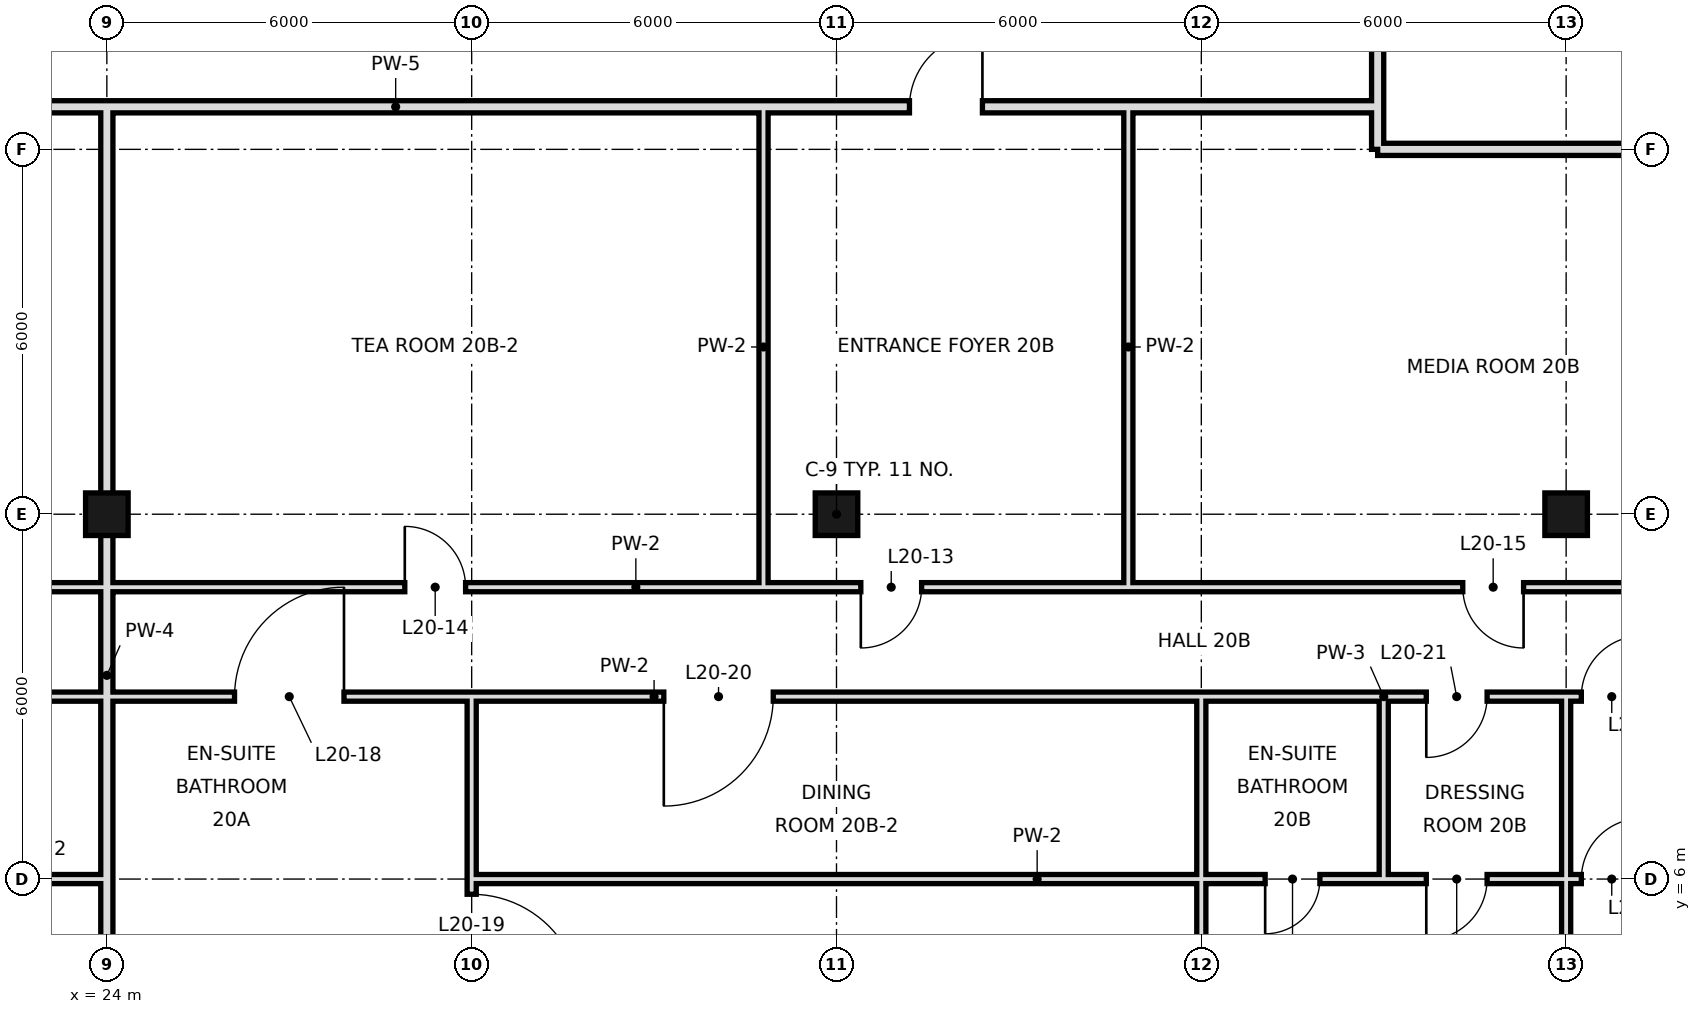
"""IFC4 building model, lengths in metres.
Left out: names, types, materials, properties, quantities, classifications, styles, units other than length and angle.
Written with IfcOpenShell. Run it as: python <this file> out.ifc"""

import sys

from ifc_helpers import new_model, si_unit, direction, frame, frame_2d, origin, origin_2d, place, context, subcontext, project, spatial, rectangle, hollow_rectangle, extrude, element, fill, save


model = new_model("IFC4")
c1 = context("Model", 3, precision=1e-05, world=origin(), true_north=direction((0.0, 1.0)))
c2 = subcontext(c1, "Body", "Model", "MODEL_VIEW")
j1 = project(units=[si_unit("LENGTHUNIT", "METRE"), si_unit("PLANEANGLEUNIT", "RADIAN")], contexts=[c1])
p1 = place(None, origin())
s1 = spatial("IfcSite", under=j1, at=p1, CompositionType="ELEMENT")
p2 = place(p1, origin())
s2 = spatial("IfcBuilding", under=s1, at=p2, CompositionType="ELEMENT")
p3 = place(p2, frame((0.0, 0.0, 96.2)))
s3 = spatial("IfcBuildingStorey", under=s2, at=p3, CompositionType="ELEMENT", Elevation=96.2)
for number, where, z_axis, x_axis in (
    (1, (24.0, 12.0, 0.0), (0.0, 0.0, 1.0), (1.0, 0.0, 0.0)),
    (2, (36.0, 12.0, 0.0), (0.0, 0.0, 1.0), (1.0, 0.0, 0.0)),
    (3, (48.0, 12.0, 0.0), (0.0, 0.0, 1.0), (1.0, 0.0, 0.0)),
):
    element("IfcColumn", number, at=place(p3, frame(where, z_axis=z_axis, x_axis=x_axis)), inside=s3, PredefinedType="COLUMN", context=c2, shape_type="SweptSolid", body=[
        extrude(hollow_rectangle(XDim=0.7, YDim=0.7, WallThickness=0.036, at=origin_2d()), origin(), (0.0, 0.0, 1.0), 3.6),
    ])
p4 = place(p3, frame((24.0, 0.0, 0.0), z_axis=(0.0, 0.0, 1.0), x_axis=(0.0, 1.0, 0.0)))
e4 = element("IfcWall", 4, at=p4, inside=s3, PredefinedType="SOLIDWALL", context=c2, shape_type="SweptSolid", body=[
    extrude(rectangle(XDim=18.7, YDim=0.2, at=frame_2d((9.35, 0.0))), origin(), (0.0, 0.0, 1.0), 2.72),
])
p5 = place(p3, frame((30.0, -0.6, 0.0), z_axis=(0.0, 0.0, 1.0), x_axis=(0.0, 1.0, 0.0)))
e5 = element("IfcWall", 5, at=p5, inside=s3, PredefinedType="PARTITIONING", context=c2, shape_type="SweptSolid", body=[
    extrude(rectangle(XDim=9.6, YDim=0.15, at=frame_2d((4.8, 0.0))), origin(), (0.0, 0.0, 1.0), 2.72),
])
p6 = place(p5, frame((4.55, 0.0, 0.0)))
e6 = element("IfcOpeningElement", 6, at=p6, cuts=e5, PredefinedType="OPENING", context=c2, shape_type="SweptSolid", body=[
    extrude(rectangle(XDim=1.8, YDim=2.4, at=frame_2d((0.9, 1.2))), frame((0.0, 0.085, 0.0), z_axis=(0.0, -1.0, 0.0), x_axis=(1.0, 0.0, 0.0)), (0.0, 0.0, 1.0), 0.17),
])
for number, where, z_axis, x_axis in (
    (7, (34.8, 10.8, 0.0), (0.0, 0.0, 1.0), (0.0, 1.0, 0.0)),
    (8, (40.8, 10.8, 0.0), (0.0, 0.0, 1.0), (0.0, 1.0, 0.0)),
):
    element("IfcWall", number, at=place(p3, frame(where, z_axis=z_axis, x_axis=x_axis)), inside=s3, PredefinedType="PARTITIONING", context=c2, shape_type="SweptSolid", body=[
        extrude(rectangle(XDim=7.9, YDim=0.15, at=frame_2d((3.95, 0.0))), origin(), (0.0, 0.0, 1.0), 3.42),
    ])
p7 = place(p3, frame((42.0, -0.6, 0.0), z_axis=(0.0, 0.0, 1.0), x_axis=(0.0, 1.0, 0.0)))
e9 = element("IfcWall", 9, at=p7, inside=s3, PredefinedType="PARTITIONING", context=c2, shape_type="SweptSolid", body=[
    extrude(rectangle(XDim=6.6, YDim=0.15, at=frame_2d((3.3, 0.0))), origin(), (0.0, 0.0, 1.0), 2.72),
])
p8 = place(p3, frame((42.0, 6.0, 0.0), z_axis=(0.0, 0.0, 1.0), x_axis=(0.0, 1.0, 0.0)))
e10 = element("IfcWall", 10, at=p8, inside=s3, PredefinedType="PARTITIONING", context=c2, shape_type="SweptSolid", body=[
    extrude(rectangle(XDim=3.0, YDim=0.15, at=frame_2d((1.5, 0.0))), origin(), (0.0, 0.0, 1.0), 2.72),
])
p9 = place(p3, frame((44.9, 18.0, 0.0), z_axis=(0.0, 0.0, 1.0), x_axis=(0.0, 1.0, 0.0)))
e11 = element("IfcWall", 11, at=p9, inside=s3, PredefinedType="SOLIDWALL", context=c2, shape_type="SweptSolid", body=[
    extrude(rectangle(XDim=4.2, YDim=0.2, at=frame_2d((2.1, 0.0))), origin(), (0.0, 0.0, 1.0), 2.97),
])
p10 = place(p3, frame((45.0, 6.0, 0.0), z_axis=(0.0, 0.0, 1.0), x_axis=(0.0, 1.0, 0.0)))
e12 = element("IfcWall", 12, at=p10, inside=s3, PredefinedType="PARTITIONING", context=c2, shape_type="SweptSolid", body=[
    extrude(rectangle(XDim=3.0, YDim=0.15, at=frame_2d((1.5, 0.0))), origin(), (0.0, 0.0, 1.0), 3.42),
])
p11 = place(p3, frame((48.0, 0.0, 0.0), z_axis=(0.0, 0.0, 1.0), x_axis=(0.0, 1.0, 0.0)))
e13 = element("IfcWall", 13, at=p11, inside=s3, PredefinedType="PARTITIONING", context=c2, shape_type="SweptSolid", body=[
    extrude(rectangle(XDim=9.0, YDim=0.15, at=frame_2d((4.5, 0.0))), origin(), (0.0, 0.0, 1.0), 2.72),
])
p12 = place(p3, frame((12.6, 10.8, 0.0), z_axis=(0.0, 0.0, 1.0), x_axis=(1.0, 0.0, 0.0)))
e14 = element("IfcWall", 14, at=p12, inside=s3, PredefinedType="PARTITIONING", context=c2, shape_type="SweptSolid", body=[
    extrude(rectangle(XDim=40.2, YDim=0.15, at=frame_2d((20.1, 0.0))), origin(), (0.0, 0.0, 1.0), 3.42),
])
p13 = place(p12, frame((8.5, 0.0, 0.0)))
e15 = element("IfcOpeningElement", 15, at=p13, cuts=e14, PredefinedType="OPENING", context=c2, shape_type="SweptSolid", body=[
    extrude(rectangle(XDim=1.0, YDim=2.4, at=frame_2d((0.5, 1.2))), frame((0.0, 0.085, 0.0), z_axis=(0.0, -1.0, 0.0), x_axis=(1.0, 0.0, 0.0)), (0.0, 0.0, 1.0), 0.17),
])
p14 = place(p12, frame((1.78, 0.0, 0.0)))
e16 = element("IfcOpeningElement", 16, at=p14, cuts=e14, PredefinedType="OPENING", context=c2, shape_type="SweptSolid", body=[
    extrude(rectangle(XDim=1.0, YDim=2.4, at=frame_2d((0.5, 1.2))), frame((0.0, 0.085, 0.0), z_axis=(0.0, -1.0, 0.0), x_axis=(1.0, 0.0, 0.0)), (0.0, 0.0, 1.0), 0.17),
])
p15 = place(p12, frame((23.8, 0.0, 0.0)))
e17 = element("IfcOpeningElement", 17, at=p15, cuts=e14, PredefinedType="OPENING", context=c2, shape_type="SweptSolid", body=[
    extrude(rectangle(XDim=1.0, YDim=2.4, at=frame_2d((0.5, 1.2))), frame((0.0, 0.085, 0.0), z_axis=(0.0, -1.0, 0.0), x_axis=(1.0, 0.0, 0.0)), (0.0, 0.0, 1.0), 0.17),
])
p16 = place(p12, frame((16.3, 0.0, 0.0)))
e18 = element("IfcOpeningElement", 18, at=p16, cuts=e14, PredefinedType="OPENING", context=c2, shape_type="SweptSolid", body=[
    extrude(rectangle(XDim=1.0, YDim=2.4, at=frame_2d((0.5, 1.2))), frame((0.0, 0.085, 0.0), z_axis=(0.0, -1.0, 0.0), x_axis=(1.0, 0.0, 0.0)), (0.0, 0.0, 1.0), 0.17),
])
p17 = place(p12, frame((33.7, 0.0, 0.0)))
e19 = element("IfcOpeningElement", 19, at=p17, cuts=e14, PredefinedType="OPENING", context=c2, shape_type="SweptSolid", body=[
    extrude(rectangle(XDim=1.0, YDim=2.4, at=frame_2d((0.5, 1.2))), frame((0.0, 0.085, 0.0), z_axis=(0.0, -1.0, 0.0), x_axis=(1.0, 0.0, 0.0)), (0.0, 0.0, 1.0), 0.17),
])
p18 = place(p3, frame((44.9, 18.0, 0.0), z_axis=(0.0, 0.0, 1.0), x_axis=(1.0, 0.0, 0.0)))
e20 = element("IfcWall", 20, at=p18, inside=s3, PredefinedType="SOLIDWALL", context=c2, shape_type="SweptSolid", body=[
    extrude(rectangle(XDim=4.3, YDim=0.2, at=frame_2d((2.15, 0.0))), origin(), (0.0, 0.0, 1.0), 2.72),
])
p19 = place(p3, frame((12.6, 18.7, 0.0), z_axis=(0.0, 0.0, 1.0), x_axis=(1.0, 0.0, 0.0)))
e21 = element("IfcWall", 21, at=p19, inside=s3, PredefinedType="SOLIDWALL", context=c2, shape_type="SweptSolid", body=[
    extrude(rectangle(XDim=32.3, YDim=0.2, at=frame_2d((16.15, 0.0))), origin(), (0.0, 0.0, 1.0), 2.72),
])
p20 = place(p19, frame((7.78, 0.0, 0.0)))
e22 = element("IfcOpeningElement", 22, at=p20, cuts=e21, PredefinedType="OPENING", context=c2, shape_type="SweptSolid", body=[
    extrude(rectangle(XDim=1.2, YDim=2.4, at=frame_2d((0.6, 1.2))), frame((0.0, 0.11, 0.0), z_axis=(0.0, -1.0, 0.0), x_axis=(1.0, 0.0, 0.0)), (0.0, 0.0, 1.0), 0.22),
])
p21 = place(p19, frame((24.6, 0.0, 0.0)))
e23 = element("IfcOpeningElement", 23, at=p21, cuts=e21, PredefinedType="OPENING", context=c2, shape_type="SweptSolid", body=[
    extrude(rectangle(XDim=1.2, YDim=2.4, at=frame_2d((0.6, 1.2))), frame((0.0, 0.11, 0.0), z_axis=(0.0, -1.0, 0.0), x_axis=(1.0, 0.0, 0.0)), (0.0, 0.0, 1.0), 0.22),
])
p22 = place(p3, frame((30.0, 6.0, 0.0), z_axis=(0.0, 0.0, 1.0), x_axis=(1.0, 0.0, 0.0)))
e24 = element("IfcWall", 24, at=p22, inside=s3, PredefinedType="PARTITIONING", context=c2, shape_type="SweptSolid", body=[
    extrude(rectangle(XDim=12.0, YDim=0.15, at=frame_2d((6.0, 0.0))), origin(), (0.0, 0.0, 1.0), 2.97),
])
p23 = place(p3, frame((45.0, 6.0, 0.0), z_axis=(0.0, 0.0, 1.0), x_axis=(1.0, 0.0, 0.0)))
e25 = element("IfcWall", 25, at=p23, inside=s3, PredefinedType="PARTITIONING", context=c2, shape_type="SweptSolid", body=[
    extrude(rectangle(XDim=15.0, YDim=0.15, at=frame_2d((7.5, 0.0))), origin(), (0.0, 0.0, 1.0), 2.72),
])
p24 = place(p23, frame((0.7, 0.0, 0.0)))
e26 = element("IfcOpeningElement", 26, at=p24, cuts=e25, PredefinedType="OPENING", context=c2, shape_type="SweptSolid", body=[
    extrude(rectangle(XDim=1.0, YDim=2.4, at=frame_2d((0.5, 1.2))), frame((0.0, 0.085, 0.0), z_axis=(0.0, -1.0, 0.0), x_axis=(1.0, 0.0, 0.0)), (0.0, 0.0, 1.0), 0.17),
])
p25 = place(p23, frame((3.25, 0.0, 0.0)))
e27 = element("IfcOpeningElement", 27, at=p25, cuts=e25, PredefinedType="OPENING", context=c2, shape_type="SweptSolid", body=[
    extrude(rectangle(XDim=1.0, YDim=2.4, at=frame_2d((0.5, 1.2))), frame((0.0, 0.085, 0.0), z_axis=(0.0, -1.0, 0.0), x_axis=(1.0, 0.0, 0.0)), (0.0, 0.0, 1.0), 0.17),
])
p26 = place(p3, frame((21.6, 6.0, 0.0), z_axis=(0.0, 0.0, 1.0), x_axis=(1.0, 0.0, 0.0)))
e28 = element("IfcWall", 28, at=p26, inside=s3, PredefinedType="PARTITIONING", context=c2, shape_type="SweptSolid", body=[
    extrude(rectangle(XDim=2.4, YDim=0.15, at=frame_2d((1.2, 0.0))), origin(), (0.0, 0.0, 1.0), 2.97),
])
p27 = place(p26, frame((0.25, 0.0, 0.0)))
e29 = element("IfcOpeningElement", 29, at=p27, cuts=e28, PredefinedType="OPENING", context=c2, shape_type="SweptSolid", body=[
    extrude(rectangle(XDim=0.9, YDim=2.4, at=frame_2d((0.45, 1.2))), frame((0.0, 0.085, 0.0), z_axis=(0.0, -1.0, 0.0), x_axis=(1.0, 0.0, 0.0)), (0.0, 0.0, 1.0), 0.17),
])
p28 = place(p3, frame((42.0, 6.0, 0.0), z_axis=(0.0, 0.0, 1.0), x_axis=(1.0, 0.0, 0.0)))
e30 = element("IfcWall", 30, at=p28, inside=s3, PredefinedType="PARTITIONING", context=c2, shape_type="SweptSolid", body=[
    extrude(rectangle(XDim=3.0, YDim=0.15, at=frame_2d((1.5, 0.0))), origin(), (0.0, 0.0, 1.0), 2.97),
])
p29 = place(p28, frame((1.05, 0.0, 0.0)))
e31 = element("IfcOpeningElement", 31, at=p29, cuts=e30, PredefinedType="OPENING", context=c2, shape_type="SweptSolid", body=[
    extrude(rectangle(XDim=0.9, YDim=2.4, at=frame_2d((0.45, 1.2))), frame((0.0, 0.085, 0.0), z_axis=(0.0, -1.0, 0.0), x_axis=(1.0, 0.0, 0.0)), (0.0, 0.0, 1.0), 0.17),
])
p30 = place(p3, frame((24.0, 9.0, 0.0), z_axis=(0.0, 0.0, 1.0), x_axis=(1.0, 0.0, 0.0)))
e32 = element("IfcWall", 32, at=p30, inside=s3, PredefinedType="PARTITIONING", context=c2, shape_type="SweptSolid", body=[
    extrude(rectangle(XDim=18.0, YDim=0.15, at=frame_2d((9.0, 0.0))), origin(), (0.0, 0.0, 1.0), 3.42),
])
p31 = place(p30, frame((2.1, 0.0, 0.0)))
e33 = element("IfcOpeningElement", 33, at=p31, cuts=e32, PredefinedType="OPENING", context=c2, shape_type="SweptSolid", body=[
    extrude(rectangle(XDim=1.8, YDim=2.4, at=frame_2d((0.9, 1.2))), frame((0.0, 0.085, 0.0), z_axis=(0.0, -1.0, 0.0), x_axis=(1.0, 0.0, 0.0)), (0.0, 0.0, 1.0), 0.17),
])
p32 = place(p30, frame((9.16, 0.0, 0.0)))
e34 = element("IfcOpeningElement", 34, at=p32, cuts=e32, PredefinedType="OPENING", context=c2, shape_type="SweptSolid", body=[
    extrude(rectangle(XDim=1.8, YDim=2.4, at=frame_2d((0.9, 1.2))), frame((0.0, 0.085, 0.0), z_axis=(0.0, -1.0, 0.0), x_axis=(1.0, 0.0, 0.0)), (0.0, 0.0, 1.0), 0.17),
])
p33 = place(p3, frame((45.0, 9.0, 0.0), z_axis=(0.0, 0.0, 1.0), x_axis=(1.0, 0.0, 0.0)))
e35 = element("IfcWall", 35, at=p33, inside=s3, PredefinedType="PARTITIONING", context=c2, shape_type="SweptSolid", body=[
    extrude(rectangle(XDim=15.6, YDim=0.15, at=frame_2d((7.8, 0.0))), origin(), (0.0, 0.0, 1.0), 3.42),
])
p34 = place(p33, frame((0.7, 0.0, 0.0)))
e36 = element("IfcOpeningElement", 36, at=p34, cuts=e35, PredefinedType="OPENING", context=c2, shape_type="SweptSolid", body=[
    extrude(rectangle(XDim=1.0, YDim=2.4, at=frame_2d((0.5, 1.2))), frame((0.0, 0.085, 0.0), z_axis=(0.0, -1.0, 0.0), x_axis=(1.0, 0.0, 0.0)), (0.0, 0.0, 1.0), 0.17),
])
p35 = place(p33, frame((3.25, 0.0, 0.0)))
e37 = element("IfcOpeningElement", 37, at=p35, cuts=e35, PredefinedType="OPENING", context=c2, shape_type="SweptSolid", body=[
    extrude(rectangle(XDim=1.0, YDim=2.4, at=frame_2d((0.5, 1.2))), frame((0.0, 0.085, 0.0), z_axis=(0.0, -1.0, 0.0), x_axis=(1.0, 0.0, 0.0)), (0.0, 0.0, 1.0), 0.17),
])
p36 = place(p3, frame((21.6, 9.0, 0.0), z_axis=(0.0, 0.0, 1.0), x_axis=(1.0, 0.0, 0.0)))
e38 = element("IfcWall", 38, at=p36, inside=s3, PredefinedType="PARTITIONING", context=c2, shape_type="SweptSolid", body=[
    extrude(rectangle(XDim=2.4, YDim=0.15, at=frame_2d((1.2, 0.0))), origin(), (0.0, 0.0, 1.0), 3.42),
])
p37 = place(p3, frame((42.0, 9.0, 0.0), z_axis=(0.0, 0.0, 1.0), x_axis=(1.0, 0.0, 0.0)))
e39 = element("IfcWall", 39, at=p37, inside=s3, PredefinedType="PARTITIONING", context=c2, shape_type="SweptSolid", body=[
    extrude(rectangle(XDim=3.0, YDim=0.15, at=frame_2d((1.5, 0.0))), origin(), (0.0, 0.0, 1.0), 3.42),
])
p38 = place(p15, frame((1.0, 0.0, 0.0), z_axis=(0.0, 0.0, 1.0), x_axis=(-1.0, 0.0, 0.0)))
e40 = element("IfcDoor", 40, at=p38, inside=s3, OperationType="SINGLE_SWING_RIGHT", PredefinedType="DOOR", context=c2, shape_type="SweptSolid", body=[
    extrude(rectangle(XDim=1.0, YDim=2.4, at=frame_2d((0.5, 1.2))), frame((0.0, 0.025, 0.0), z_axis=(0.0, -1.0, 0.0), x_axis=(1.0, 0.0, 0.0)), (0.0, 0.0, 1.0), 0.05),
])
fill(e17, e40)
p39 = place(p16, origin())
e41 = element("IfcDoor", 41, at=p39, inside=s3, OperationType="SINGLE_SWING_LEFT", PredefinedType="DOOR", context=c2, shape_type="SweptSolid", body=[
    extrude(rectangle(XDim=1.0, YDim=2.4, at=frame_2d((0.5, 1.2))), frame((0.0, 0.025, 0.0), z_axis=(0.0, -1.0, 0.0), x_axis=(1.0, 0.0, 0.0)), (0.0, 0.0, 1.0), 0.05),
])
fill(e18, e41)
p40 = place(p17, origin())
e42 = element("IfcDoor", 42, at=p40, inside=s3, OperationType="SINGLE_SWING_RIGHT", PredefinedType="DOOR", context=c2, shape_type="SweptSolid", body=[
    extrude(rectangle(XDim=1.0, YDim=2.4, at=frame_2d((0.5, 1.2))), frame((0.0, 0.025, 0.0), z_axis=(0.0, -1.0, 0.0), x_axis=(1.0, 0.0, 0.0)), (0.0, 0.0, 1.0), 0.05),
])
fill(e19, e42)
p41 = place(p31, frame((1.8, 0.0, 0.0), z_axis=(0.0, 0.0, 1.0), x_axis=(-1.0, 0.0, 0.0)))
e43 = element("IfcDoor", 43, at=p41, inside=s3, OperationType="SINGLE_SWING_LEFT", PredefinedType="DOOR", context=c2, shape_type="SweptSolid", body=[
    extrude(rectangle(XDim=1.8, YDim=2.4, at=frame_2d((0.9, 1.2))), frame((0.0, 0.025, 0.0), z_axis=(0.0, -1.0, 0.0), x_axis=(1.0, 0.0, 0.0)), (0.0, 0.0, 1.0), 0.05),
])
fill(e33, e43)
p42 = place(p6, frame((1.8, 0.0, 0.0), z_axis=(0.0, 0.0, 1.0), x_axis=(-1.0, 0.0, 0.0)))
e44 = element("IfcDoor", 44, at=p42, inside=s3, OperationType="SINGLE_SWING_RIGHT", PredefinedType="DOOR", context=c2, shape_type="SweptSolid", body=[
    extrude(rectangle(XDim=1.8, YDim=2.4, at=frame_2d((0.9, 1.2))), frame((0.0, 0.025, 0.0), z_axis=(0.0, -1.0, 0.0), x_axis=(1.0, 0.0, 0.0)), (0.0, 0.0, 1.0), 0.05),
])
fill(e6, e44)
p43 = place(p32, frame((1.8, 0.0, 0.0), z_axis=(0.0, 0.0, 1.0), x_axis=(-1.0, 0.0, 0.0)))
e45 = element("IfcDoor", 45, at=p43, inside=s3, OperationType="SINGLE_SWING_RIGHT", PredefinedType="DOOR", context=c2, shape_type="SweptSolid", body=[
    extrude(rectangle(XDim=1.8, YDim=2.4, at=frame_2d((0.9, 1.2))), frame((0.0, 0.025, 0.0), z_axis=(0.0, -1.0, 0.0), x_axis=(1.0, 0.0, 0.0)), (0.0, 0.0, 1.0), 0.05),
])
fill(e34, e45)
p44 = place(p34, frame((1.0, 0.0, 0.0), z_axis=(0.0, 0.0, 1.0), x_axis=(-1.0, 0.0, 0.0)))
e46 = element("IfcDoor", 46, at=p44, inside=s3, OperationType="SINGLE_SWING_RIGHT", PredefinedType="DOOR", context=c2, shape_type="SweptSolid", body=[
    extrude(rectangle(XDim=1.0, YDim=2.4, at=frame_2d((0.5, 1.2))), frame((0.0, 0.025, 0.0), z_axis=(0.0, -1.0, 0.0), x_axis=(1.0, 0.0, 0.0)), (0.0, 0.0, 1.0), 0.05),
])
fill(e36, e46)
p45 = place(p35, frame((1.0, 0.0, 0.0), z_axis=(0.0, 0.0, 1.0), x_axis=(-1.0, 0.0, 0.0)))
e47 = element("IfcDoor", 47, at=p45, inside=s3, OperationType="SINGLE_SWING_LEFT", PredefinedType="DOOR", context=c2, shape_type="SweptSolid", body=[
    extrude(rectangle(XDim=1.0, YDim=2.4, at=frame_2d((0.5, 1.2))), frame((0.0, 0.025, 0.0), z_axis=(0.0, -1.0, 0.0), x_axis=(1.0, 0.0, 0.0)), (0.0, 0.0, 1.0), 0.05),
])
fill(e37, e47)
p46 = place(p24, frame((1.0, 0.0, 0.0), z_axis=(0.0, 0.0, 1.0), x_axis=(-1.0, 0.0, 0.0)))
e48 = element("IfcDoor", 48, at=p46, inside=s3, OperationType="SINGLE_SWING_RIGHT", PredefinedType="DOOR", context=c2, shape_type="SweptSolid", body=[
    extrude(rectangle(XDim=1.0, YDim=2.4, at=frame_2d((0.5, 1.2))), frame((0.0, 0.025, 0.0), z_axis=(0.0, -1.0, 0.0), x_axis=(1.0, 0.0, 0.0)), (0.0, 0.0, 1.0), 0.05),
])
fill(e26, e48)
p47 = place(p29, frame((0.9, 0.0, 0.0), z_axis=(0.0, 0.0, 1.0), x_axis=(-1.0, 0.0, 0.0)))
e49 = element("IfcDoor", 49, at=p47, inside=s3, OperationType="SINGLE_SWING_RIGHT", PredefinedType="DOOR", context=c2, shape_type="SweptSolid", body=[
    extrude(rectangle(XDim=0.9, YDim=2.4, at=frame_2d((0.45, 1.2))), frame((0.0, 0.025, 0.0), z_axis=(0.0, -1.0, 0.0), x_axis=(1.0, 0.0, 0.0)), (0.0, 0.0, 1.0), 0.05),
])
fill(e31, e49)
p48 = place(p25, frame((1.0, 0.0, 0.0), z_axis=(0.0, 0.0, 1.0), x_axis=(-1.0, 0.0, 0.0)))
e50 = element("IfcDoor", 50, at=p48, inside=s3, OperationType="SINGLE_SWING_LEFT", PredefinedType="DOOR", context=c2, shape_type="SweptSolid", body=[
    extrude(rectangle(XDim=1.0, YDim=2.4, at=frame_2d((0.5, 1.2))), frame((0.0, 0.025, 0.0), z_axis=(0.0, -1.0, 0.0), x_axis=(1.0, 0.0, 0.0)), (0.0, 0.0, 1.0), 0.05),
])
fill(e27, e50)
p49 = place(p21, frame((1.2, 0.0, 0.0), z_axis=(0.0, 0.0, 1.0), x_axis=(-1.0, 0.0, 0.0)))
e51 = element("IfcDoor", 51, at=p49, inside=s3, OperationType="SINGLE_SWING_LEFT", PredefinedType="DOOR", context=c2, shape_type="SweptSolid", body=[
    extrude(rectangle(XDim=1.2, YDim=2.4, at=frame_2d((0.6, 1.2))), frame((0.0, 0.025, 0.0), z_axis=(0.0, -1.0, 0.0), x_axis=(1.0, 0.0, 0.0)), (0.0, 0.0, 1.0), 0.05),
])
fill(e23, e51)
save(model, sys.argv[1])
